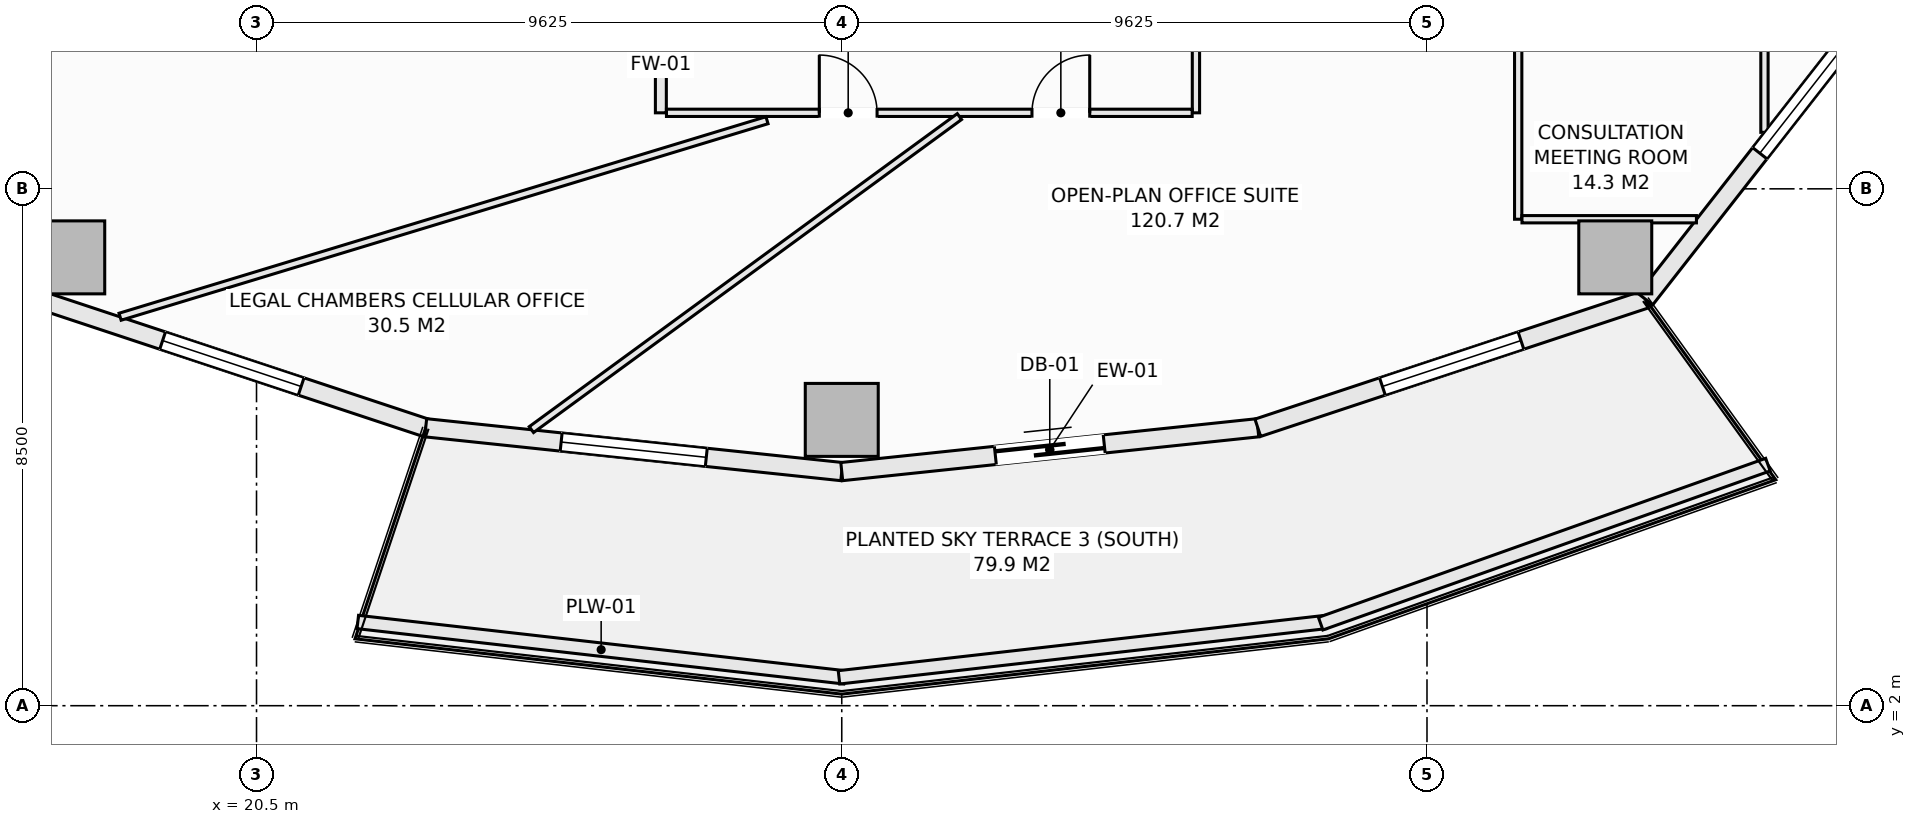
"""IFC4 building model, lengths in metres.
Left out: names, types, materials, properties, quantities, classifications, styles, units other than length and angle.
Written with IfcOpenShell. Run it as: python <this file> out.ifc"""

import sys

from ifc_helpers import new_model, si_unit, direction, frame, frame_2d, origin, origin_2d, place, context, subcontext, project, spatial, rectangle, extrude, element, fill, save


model = new_model("IFC4")
c1 = context("Model", 3, precision=1e-05, world=origin(), true_north=direction((0.0, 1.0)))
c2 = subcontext(c1, "Body", "Model", "MODEL_VIEW")
j1 = project(units=[si_unit("LENGTHUNIT", "METRE"), si_unit("PLANEANGLEUNIT", "RADIAN")], contexts=[c1])
p1 = place(None, origin())
s1 = spatial("IfcSite", under=j1, at=p1, CompositionType="ELEMENT")
p2 = place(p1, origin())
s2 = spatial("IfcBuilding", under=s1, at=p2, CompositionType="ELEMENT")
p3 = place(p2, frame((0.0, 0.0, 65.0)))
s3 = spatial("IfcBuildingStorey", under=s2, at=p3, CompositionType="ELEMENT", Elevation=65.0)
for number, where, z_axis, x_axis in (
    (1, (17.404, 9.373, -0.28), (0.0, 0.0, 1.0), (1.0, 0.0, 0.0)),
    (2, (30.125, 6.7, -0.28), (0.0, 0.0, 1.0), (1.0, 0.0, 0.0)),
    (3, (42.846, 9.373, -0.28), (0.0, 0.0, 1.0), (1.0, 0.0, 0.0)),
):
    element("IfcColumn", number, at=place(p3, frame(where, z_axis=z_axis, x_axis=x_axis)), inside=s3, PredefinedType="COLUMN", context=c2, shape_type="SweptSolid", body=[
        extrude(rectangle(XDim=1.2, YDim=1.2, at=origin_2d()), origin(), (0.0, 0.0, 1.0), 3.85),
    ])
p4 = place(p3, frame((16.906, 8.684, 0.0), z_axis=(0.0, 0.0, 1.0), x_axis=(0.949245153629, -0.314537181127, 0.0)))
e4 = element("IfcWall", 4, at=p4, inside=s3, PredefinedType="SOLIDWALL", context=c2, shape_type="SweptSolid", body=[
    extrude(rectangle(XDim=6.717, YDim=0.3, at=frame_2d((3.358, 0.0))), origin(), (0.0, 0.0, 1.0), 3.093),
])
p5 = place(p4, frame((2.159, 0.0, 0.85)))
e5 = element("IfcOpeningElement", 5, at=p5, cuts=e4, PredefinedType="OPENING", context=c2, shape_type="SweptSolid", body=[
    extrude(rectangle(XDim=2.4, YDim=1.9, at=frame_2d((1.2, 0.95))), frame((0.0, 0.16, 0.0), z_axis=(0.0, -1.0, 0.0), x_axis=(1.0, 0.0, 0.0)), (0.0, 0.0, 1.0), 0.32),
])
p6 = place(p3, frame((23.282, 6.571, 0.0), z_axis=(0.0, 0.0, 1.0), x_axis=(0.994498840295, -0.104747585419, 0.0)))
e6 = element("IfcWall", 6, at=p6, inside=s3, PredefinedType="SOLIDWALL", context=c2, shape_type="SweptSolid", body=[
    extrude(rectangle(XDim=6.88, YDim=0.3, at=frame_2d((3.44, 0.0))), origin(), (0.0, 0.0, 1.0), 3.093),
])
p7 = place(p6, frame((2.24, 0.0, 0.85)))
e7 = element("IfcOpeningElement", 7, at=p7, cuts=e6, PredefinedType="OPENING", context=c2, shape_type="SweptSolid", body=[
    extrude(rectangle(XDim=2.4, YDim=1.9, at=frame_2d((1.2, 0.95))), frame((0.0, 0.16, 0.0), z_axis=(0.0, -1.0, 0.0), x_axis=(1.0, 0.0, 0.0)), (0.0, 0.0, 1.0), 0.32),
])
p8 = place(p3, frame((30.125, 5.85, 0.0), z_axis=(0.0, 0.0, 1.0), x_axis=(0.994498840295, 0.104747585419, 0.0)))
e8 = element("IfcWall", 8, at=p8, inside=s3, PredefinedType="SOLIDWALL", context=c2, shape_type="SweptSolid", body=[
    extrude(rectangle(XDim=6.88, YDim=0.3, at=frame_2d((3.44, 0.0))), origin(), (0.0, 0.0, 1.0), 3.093),
])
p9 = place(p8, frame((2.54, 0.0, 0.0)))
e9 = element("IfcOpeningElement", 9, at=p9, cuts=e8, PredefinedType="OPENING", context=c2, shape_type="SweptSolid", body=[
    extrude(rectangle(XDim=1.8, YDim=2.25, at=frame_2d((0.9, 1.125))), frame((0.0, 0.16, 0.0), z_axis=(0.0, -1.0, 0.0), x_axis=(1.0, 0.0, 0.0)), (0.0, 0.0, 1.0), 0.32),
])
p10 = place(p3, frame((36.968, 6.571, 0.0), z_axis=(0.0, 0.0, 1.0), x_axis=(0.949245153629, 0.314537181127, 0.0)))
e10 = element("IfcWall", 10, at=p10, inside=s3, PredefinedType="SOLIDWALL", context=c2, shape_type="SweptSolid", body=[
    extrude(rectangle(XDim=6.717, YDim=0.3, at=frame_2d((3.358, 0.0))), origin(), (0.0, 0.0, 1.0), 3.093),
])
p11 = place(p10, frame((2.159, 0.0, 0.85)))
e11 = element("IfcOpeningElement", 11, at=p11, cuts=e10, PredefinedType="OPENING", context=c2, shape_type="SweptSolid", body=[
    extrude(rectangle(XDim=2.4, YDim=1.9, at=frame_2d((1.2, 0.95))), frame((0.0, 0.16, 0.0), z_axis=(0.0, -1.0, 0.0), x_axis=(1.0, 0.0, 0.0)), (0.0, 0.0, 1.0), 0.32),
])
p12 = place(p3, frame((43.344, 8.684, 0.0), z_axis=(0.0, 0.0, 1.0), x_axis=(0.616434798832, 0.78740595552, 0.0)))
e12 = element("IfcWall", 12, at=p12, inside=s3, PredefinedType="SOLIDWALL", context=c2, shape_type="SweptSolid", body=[
    extrude(rectangle(XDim=6.294, YDim=0.3, at=frame_2d((3.147, 0.0))), origin(), (0.0, 0.0, 1.0), 3.093),
])
p13 = place(p12, frame((3.05, 0.0, 0.85)))
e13 = element("IfcOpeningElement", 13, at=p13, cuts=e12, PredefinedType="OPENING", context=c2, shape_type="SweptSolid", body=[
    extrude(rectangle(XDim=2.4, YDim=1.9, at=frame_2d((1.2, 0.95))), frame((0.0, 0.16, 0.0), z_axis=(0.0, -1.0, 0.0), x_axis=(1.0, 0.0, 0.0)), (0.0, 0.0, 1.0), 0.32),
])
for number, where, z_axis, x_axis in (
    (14, (22.166, 3.376, 0.0), (0.0, 0.0, 1.0), (0.994, -0.113, 0.0)),
    (15, (30.08, 2.466, 0.0), (0.0, 0.0, 1.0), (0.994, 0.113, 0.0)),
):
    element("IfcWall", number, at=place(p3, frame(where, z_axis=z_axis, x_axis=x_axis)), inside=s3, PredefinedType="PARAPET", context=c2, shape_type="SweptSolid", body=[
        extrude(rectangle(XDim=8.056, YDim=0.22, at=frame_2d((4.028, 0.0))), origin(), (0.0, 0.0, 1.0), 0.52),
    ])
p14 = place(p3, frame((38.001, 3.349, 0.0), z_axis=(0.0, 0.0, 1.0), x_axis=(0.942203722205, 0.335040513764, 0.0)))
e16 = element("IfcWall", 16, at=p14, inside=s3, PredefinedType="PARAPET", context=c2, shape_type="SweptSolid", body=[
    extrude(rectangle(XDim=7.807, YDim=0.22, at=frame_2d((3.904, 0.0))), origin(), (0.0, 0.0, 1.0), 0.52),
])
p15 = place(p3, frame((27.15, 11.75, 0.0), z_axis=(0.0, 0.0, 1.0), x_axis=(0.0, 1.0, 0.0)))
e17 = element("IfcWall", 17, at=p15, inside=s3, PredefinedType="SOLIDWALL", context=c2, shape_type="SweptSolid", body=[
    extrude(rectangle(XDim=5.208, YDim=0.18, at=frame_2d((2.604, 0.0))), origin(), (0.0, 0.0, 1.0), 3.57),
])
p16 = place(p15, frame((2.129, 0.0, 0.0)))
e18 = element("IfcOpeningElement", 18, at=p16, cuts=e17, PredefinedType="OPENING", context=c2, shape_type="SweptSolid", body=[
    extrude(rectangle(XDim=0.95, YDim=2.1, at=frame_2d((0.475, 1.05))), frame((0.0, 0.1, 0.0), z_axis=(0.0, -1.0, 0.0), x_axis=(1.0, 0.0, 0.0)), (0.0, 0.0, 1.0), 0.2),
])
p17 = place(p3, frame((35.95, 11.75, 0.0), z_axis=(0.0, 0.0, 1.0), x_axis=(0.0, 1.0, 0.0)))
e19 = element("IfcWall", 19, at=p17, inside=s3, PredefinedType="PARTITIONING", context=c2, shape_type="SweptSolid", body=[
    extrude(rectangle(XDim=3.838, YDim=0.12, at=frame_2d((1.919, 0.0))), origin(), (0.0, 0.0, 1.0), 3.57),
])
p18 = place(p3, frame((27.242, 11.75, 0.0), z_axis=(0.0, 0.0, 1.0), x_axis=(1.0, 0.0, 0.0)))
e20 = element("IfcWall", 20, at=p18, inside=s3, PredefinedType="PARTITIONING", context=c2, shape_type="SweptSolid", body=[
    extrude(rectangle(XDim=8.646, YDim=0.12, at=frame_2d((4.323, 0.0))), origin(), (0.0, 0.0, 1.0), 3.57),
])
p19 = place(p18, frame((2.514, 0.0, 0.0)))
e21 = element("IfcOpeningElement", 21, at=p19, cuts=e20, PredefinedType="OPENING", context=c2, shape_type="SweptSolid", body=[
    extrude(rectangle(XDim=0.95, YDim=2.1, at=frame_2d((0.475, 1.05))), frame((0.0, 0.07, 0.0), z_axis=(0.0, -1.0, 0.0), x_axis=(1.0, 0.0, 0.0)), (0.0, 0.0, 1.0), 0.14),
])
p20 = place(p18, frame((6.011, 0.0, 0.0)))
e22 = element("IfcOpeningElement", 22, at=p20, cuts=e20, PredefinedType="OPENING", context=c2, shape_type="SweptSolid", body=[
    extrude(rectangle(XDim=0.95, YDim=2.1, at=frame_2d((0.475, 1.05))), frame((0.0, 0.07, 0.0), z_axis=(0.0, -1.0, 0.0), x_axis=(1.0, 0.0, 0.0)), (0.0, 0.0, 1.0), 0.14),
])
p21 = place(p3, frame((18.256, 8.396, 0.0), z_axis=(0.0, 0.0, 1.0), x_axis=(0.9568399174, 0.290615506246, 0.0)))
e23 = element("IfcWall", 23, at=p21, inside=s3, PredefinedType="PARTITIONING", context=c2, shape_type="SweptSolid", body=[
    extrude(rectangle(XDim=11.119, YDim=0.12, at=frame_2d((5.56, 0.0))), origin(), (0.0, 0.0, 1.0), 3.093),
])
p22 = place(p3, frame((25.021, 6.541, 0.0), z_axis=(0.0, 0.0, 1.0), x_axis=(0.80721771605, 0.590253808878, 0.0)))
e24 = element("IfcWall", 24, at=p22, inside=s3, PredefinedType="PARTITIONING", context=c2, shape_type="SweptSolid", body=[
    extrude(rectangle(XDim=8.721, YDim=0.12, at=frame_2d((4.36, 0.0))), origin(), (0.0, 0.0, 1.0), 3.57),
])
p23 = place(p3, frame((45.3, 11.429, 0.0), z_axis=(0.0, 0.0, 1.0), x_axis=(0.0, 1.0, 0.0)))
e25 = element("IfcWall", 25, at=p23, inside=s3, PredefinedType="PARTITIONING", context=c2, shape_type="SweptSolid", body=[
    extrude(rectangle(XDim=2.271, YDim=0.12, at=frame_2d((1.135, 0.0))), origin(), (0.0, 0.0, 1.0), 3.57),
])
p24 = place(p3, frame((41.25, 10.0, 0.0), z_axis=(0.0, 0.0, 1.0), x_axis=(0.0, 1.0, 0.0)))
e26 = element("IfcWall", 26, at=p24, inside=s3, PredefinedType="PARTITIONING", context=c2, shape_type="SweptSolid", body=[
    extrude(rectangle(XDim=3.638, YDim=0.12, at=frame_2d((1.819, 0.0))), origin(), (0.0, 0.0, 1.0), 2.934),
])
p25 = place(p3, frame((41.312, 10.0, 0.0), z_axis=(0.0, 0.0, 1.0), x_axis=(1.0, 0.0, 0.0)))
e27 = element("IfcWall", 27, at=p25, inside=s3, PredefinedType="PARTITIONING", context=c2, shape_type="SweptSolid", body=[
    extrude(rectangle(XDim=2.869, YDim=0.12, at=frame_2d((1.435, 0.0))), origin(), (0.0, 0.0, 1.0), 3.093),
])
p26 = place(p5, origin())
e28 = element("IfcWindow", 28, at=p26, inside=s3, PartitioningType="SINGLE_PANEL", PredefinedType="WINDOW", context=c2, shape_type="SweptSolid", body=[
    extrude(rectangle(XDim=2.4, YDim=1.9, at=frame_2d((1.2, 0.95))), frame((0.0, 0.03, 0.0), z_axis=(0.0, -1.0, 0.0), x_axis=(1.0, 0.0, 0.0)), (0.0, 0.0, 1.0), 0.06),
])
fill(e5, e28)
p27 = place(p7, origin())
e29 = element("IfcWindow", 29, at=p27, inside=s3, PartitioningType="SINGLE_PANEL", PredefinedType="WINDOW", context=c2, shape_type="SweptSolid", body=[
    extrude(rectangle(XDim=2.4, YDim=1.9, at=frame_2d((1.2, 0.95))), frame((0.0, 0.03, 0.0), z_axis=(0.0, -1.0, 0.0), x_axis=(1.0, 0.0, 0.0)), (0.0, 0.0, 1.0), 0.06),
])
fill(e7, e29)
p28 = place(p9, frame((1.8, 0.0, 0.0), z_axis=(0.0, 0.0, 1.0), x_axis=(-1.0, 0.0, 0.0)))
e30 = element("IfcDoor", 30, at=p28, inside=s3, OperationType="SLIDING_TO_LEFT", PredefinedType="DOOR", context=c2, shape_type="SweptSolid", body=[
    extrude(rectangle(XDim=1.8, YDim=2.25, at=frame_2d((0.9, 1.125))), frame((0.0, 0.025, 0.0), z_axis=(0.0, -1.0, 0.0), x_axis=(1.0, 0.0, 0.0)), (0.0, 0.0, 1.0), 0.05),
])
fill(e9, e30)
p29 = place(p11, origin())
e31 = element("IfcWindow", 31, at=p29, inside=s3, PartitioningType="SINGLE_PANEL", PredefinedType="WINDOW", context=c2, shape_type="SweptSolid", body=[
    extrude(rectangle(XDim=2.4, YDim=1.9, at=frame_2d((1.2, 0.95))), frame((0.0, 0.03, 0.0), z_axis=(0.0, -1.0, 0.0), x_axis=(1.0, 0.0, 0.0)), (0.0, 0.0, 1.0), 0.06),
])
fill(e11, e31)
p30 = place(p13, origin())
e32 = element("IfcWindow", 32, at=p30, inside=s3, PartitioningType="SINGLE_PANEL", PredefinedType="WINDOW", context=c2, shape_type="SweptSolid", body=[
    extrude(rectangle(XDim=2.4, YDim=1.9, at=frame_2d((1.2, 0.95))), frame((0.0, 0.03, 0.0), z_axis=(0.0, -1.0, 0.0), x_axis=(1.0, 0.0, 0.0)), (0.0, 0.0, 1.0), 0.06),
])
fill(e13, e32)
p31 = place(p19, origin())
e33 = element("IfcDoor", 33, at=p31, inside=s3, OperationType="SINGLE_SWING_LEFT", PredefinedType="DOOR", context=c2, shape_type="SweptSolid", body=[
    extrude(rectangle(XDim=0.95, YDim=2.1, at=frame_2d((0.475, 1.05))), frame((0.0, 0.025, 0.0), z_axis=(0.0, -1.0, 0.0), x_axis=(1.0, 0.0, 0.0)), (0.0, 0.0, 1.0), 0.05),
])
fill(e21, e33)
p32 = place(p20, origin())
e34 = element("IfcDoor", 34, at=p32, inside=s3, OperationType="SINGLE_SWING_RIGHT", PredefinedType="DOOR", context=c2, shape_type="SweptSolid", body=[
    extrude(rectangle(XDim=0.95, YDim=2.1, at=frame_2d((0.475, 1.05))), frame((0.0, 0.025, 0.0), z_axis=(0.0, -1.0, 0.0), x_axis=(1.0, 0.0, 0.0)), (0.0, 0.0, 1.0), 0.05),
])
fill(e22, e34)
save(model, sys.argv[1])
